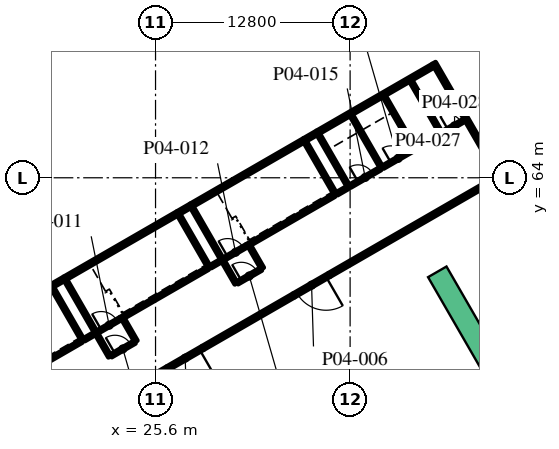
"""IFC4 building model, lengths in metres.
Left out: names, types, materials, properties, quantities, classifications, styles, units other than length and angle.
Written with IfcOpenShell. Run it as: python <this file> out.ifc"""

import sys

from ifc_helpers import new_model, si_unit, direction, frame, frame_2d, origin, place, context, subcontext, project, spatial, rectangle, extrude, element, fill, save


model = new_model("IFC4")
c1 = context("Model", 3, precision=1e-05, world=origin(), true_north=direction((0.0, 1.0)))
c2 = subcontext(c1, "Body", "Model", "MODEL_VIEW")
j1 = project(units=[si_unit("LENGTHUNIT", "METRE"), si_unit("PLANEANGLEUNIT", "RADIAN")], contexts=[c1])
p1 = place(None, origin())
s1 = spatial("IfcSite", under=j1, at=p1, CompositionType="ELEMENT")
p2 = place(p1, origin())
s2 = spatial("IfcBuilding", under=s1, at=p2, CompositionType="ELEMENT")
p3 = place(p2, frame((0.0, 0.0, 21.6)))
s3 = spatial("IfcBuildingStorey", under=s2, at=p3, CompositionType="ELEMENT", Elevation=21.6)
p4 = place(p3, frame((43.915, 71.542, 0.0), z_axis=(0.0, 0.0, 1.0), x_axis=(0.499999331568, -0.866025789703, 0.0)))
e1 = element("IfcWall", 1, at=p4, inside=s3, PredefinedType="SOLIDWALL", context=c2, shape_type="SweptSolid", body=[
    extrude(rectangle(XDim=8.625, YDim=0.25, at=frame_2d((4.312, 0.0))), origin(), (0.0, 0.0, 1.0), 4.5),
])
p5 = place(p3, frame((20.407, 48.01, 0.0), z_axis=(0.0, 0.0, 1.0), x_axis=(0.866013532718, 0.500020560727, 0.0)))
e2 = element("IfcWall", 2, at=p5, inside=s3, PredefinedType="SOLIDWALL", context=c2, shape_type="SweptSolid", body=[
    extrude(rectangle(XDim=6.9, YDim=0.25, at=frame_2d((3.45, 0.0))), origin(), (0.0, 0.0, 1.0), 4.5),
])
p6 = place(p3, frame((28.72, 52.811, 0.0), z_axis=(0.0, 0.0, 1.0), x_axis=(-0.866036505625, -0.499980770555, 0.0)))
e3 = element("IfcWall", 3, at=p6, inside=s3, PredefinedType="SOLIDWALL", context=c2, shape_type="SweptSolid", body=[
    extrude(rectangle(XDim=2.7, YDim=0.25, at=frame_2d((1.35, 0.0))), origin(), (0.0, 0.0, 1.0), 4.5),
])
p7 = place(p6, frame((0.25, 0.0, 0.0)))
e4 = element("IfcOpeningElement", 4, at=p7, cuts=e3, PredefinedType="OPENING", context=c2, shape_type="SweptSolid", body=[
    extrude(rectangle(XDim=2.2, YDim=2.1, at=frame_2d((1.1, 1.05))), frame((0.0, 0.135, 0.0), z_axis=(0.0, -1.0, 0.0), x_axis=(1.0, 0.0, 0.0)), (0.0, 0.0, 1.0), 0.27),
])
p8 = place(p3, frame((28.72, 52.811, 0.0), z_axis=(0.0, 0.0, 1.0), x_axis=(0.866028853923, 0.499994024137, 0.0)))
e5 = element("IfcWall", 5, at=p8, inside=s3, PredefinedType="SOLIDWALL", context=c2, shape_type="SweptSolid", body=[
    extrude(rectangle(XDim=6.9, YDim=0.25, at=frame_2d((3.45, 0.0))), origin(), (0.0, 0.0, 1.0), 4.5),
])
p9 = place(p3, frame((37.034, 57.611, 0.0), z_axis=(0.0, 0.0, 1.0), x_axis=(-0.866019956843, -0.50000943426, 0.0)))
e6 = element("IfcWall", 6, at=p9, inside=s3, PredefinedType="SOLIDWALL", context=c2, shape_type="SweptSolid", body=[
    extrude(rectangle(XDim=2.7, YDim=0.25, at=frame_2d((1.35, 0.0))), origin(), (0.0, 0.0, 1.0), 4.5),
])
p10 = place(p9, frame((0.25, 0.0, 0.0)))
e7 = element("IfcOpeningElement", 7, at=p10, cuts=e6, PredefinedType="OPENING", context=c2, shape_type="SweptSolid", body=[
    extrude(rectangle(XDim=2.2, YDim=2.1, at=frame_2d((1.1, 1.05))), frame((0.0, 0.135, 0.0), z_axis=(0.0, -1.0, 0.0), x_axis=(1.0, 0.0, 0.0)), (0.0, 0.0, 1.0), 0.27),
])
p11 = place(p3, frame((37.034, 57.611, 0.0), z_axis=(0.0, 0.0, 1.0), x_axis=(0.866025499775, 0.499999833739, 0.0)))
e8 = element("IfcWall", 8, at=p11, inside=s3, PredefinedType="SOLIDWALL", context=c2, shape_type="SweptSolid", body=[
    extrude(rectangle(XDim=12.8, YDim=0.25, at=frame_2d((6.4, 0.0))), origin(), (0.0, 0.0, 1.0), 4.5),
])
p12 = place(p3, frame((8.449, 50.922, 0.0), z_axis=(0.0, 0.0, 1.0), x_axis=(0.866026377112, 0.499998314143, 0.0)))
e9 = element("IfcWall", 9, at=p12, inside=s3, PredefinedType="SOLIDWALL", context=c2, shape_type="SweptSolid", body=[
    extrude(rectangle(XDim=11.9, YDim=0.25, at=frame_2d((5.95, 0.0))), origin(), (0.0, 0.0, 1.0), 4.5),
])
p13 = place(p3, frame((19.621, 57.372, 0.0), z_axis=(0.0, 0.0, 1.0), x_axis=(0.866021068297, 0.500007509209, 0.0)))
e10 = element("IfcWall", 10, at=p13, inside=s3, PredefinedType="SOLIDWALL", context=c2, shape_type="SweptSolid", body=[
    extrude(rectangle(XDim=8.6, YDim=0.25, at=frame_2d((4.3, 0.0))), origin(), (0.0, 0.0, 1.0), 4.5),
])
p14 = place(p3, frame((27.935, 62.172, 0.0), z_axis=(0.0, 0.0, 1.0), x_axis=(0.86604045752, 0.499973925258, 0.0)))
e11 = element("IfcWall", 11, at=p14, inside=s3, PredefinedType="SOLIDWALL", context=c2, shape_type="SweptSolid", body=[
    extrude(rectangle(XDim=8.6, YDim=0.25, at=frame_2d((4.3, 0.0))), origin(), (0.0, 0.0, 1.0), 4.5),
])
p15 = place(p3, frame((36.249, 66.972, 0.0), z_axis=(0.0, 0.0, 1.0), x_axis=(0.866013253925, 0.500021043584, 0.0)))
e12 = element("IfcWall", 12, at=p15, inside=s3, PredefinedType="SOLIDWALL", context=c2, shape_type="SweptSolid", body=[
    extrude(rectangle(XDim=8.8, YDim=0.25, at=frame_2d((4.4, 0.0))), origin(), (0.0, 0.0, 1.0), 4.5),
])
for number, where, z_axis, x_axis in (
    (13, (18.755, 56.872, 0.0), (0.0, 0.0, 1.0), (0.866, 0.5, 0.0)),
    (14, (27.069, 61.672, 0.0), (0.0, 0.0, 1.0), (0.866, 0.5, 0.0)),
    (15, (35.383, 66.472, 0.0), (0.0, 0.0, 1.0), (0.866, 0.5, 0.0)),
):
    element("IfcWall", number, at=place(p3, frame(where, z_axis=z_axis, x_axis=x_axis)), inside=s3, PredefinedType="SOLIDWALL", context=c2, shape_type="SweptSolid", body=[
        extrude(rectangle(XDim=1.0, YDim=0.25, at=frame_2d((0.5, 0.0))), origin(), (0.0, 0.0, 1.0), 4.5),
    ])
for number, where, z_axis, x_axis in (
    (16, (20.817, 53.299, 0.0), (0.0, 0.0, 1.0), (-0.5, 0.866, 0.0)),
    (17, (21.683, 53.799, 0.0), (0.0, 0.0, 1.0), (-0.5, 0.866, 0.0)),
    (18, (29.131, 58.099, 0.0), (0.0, 0.0, 1.0), (-0.5, 0.866, 0.0)),
    (19, (29.997, 58.599, 0.0), (0.0, 0.0, 1.0), (-0.5, 0.866, 0.0)),
    (20, (37.445, 62.899, 0.0), (0.0, 0.0, 1.0), (-0.5, 0.866, 0.0)),
):
    element("IfcWall", number, at=place(p3, frame(where, z_axis=z_axis, x_axis=x_axis)), inside=s3, PredefinedType="SOLIDWALL", context=c2, shape_type="SweptSolid", body=[
        extrude(rectangle(XDim=4.0, YDim=0.2, at=frame_2d((2.0, 0.0))), origin(), (0.0, 0.0, 1.0), 4.5),
    ])
p16 = place(p3, frame((14.972, 49.924, 0.0), z_axis=(0.0, 0.0, 1.0), x_axis=(0.86601134256, 0.500024353964, 0.0)))
e21 = element("IfcWall", 21, at=p16, inside=s3, PredefinedType="SOLIDWALL", context=c2, shape_type="SweptSolid", body=[
    extrude(rectangle(XDim=6.65, YDim=0.2, at=frame_2d((3.325, 0.0))), origin(), (0.0, 0.0, 1.0), 4.5),
])
p17 = place(p3, frame((21.77, 53.849, 0.0), z_axis=(0.0, 0.0, 1.0), x_axis=(0.866002029911, 0.500040482552, 0.0)))
e22 = element("IfcWall", 22, at=p17, inside=s3, PredefinedType="SOLIDWALL", context=c2, shape_type="SweptSolid", body=[
    extrude(rectangle(XDim=1.75, YDim=0.2, at=frame_2d((0.875, 0.0))), origin(), (0.0, 0.0, 1.0), 4.5),
])
p18 = place(p17, frame((0.3, 0.0, 0.0)))
e23 = element("IfcOpeningElement", 23, at=p18, cuts=e22, PredefinedType="OPENING", context=c2, shape_type="SweptSolid", body=[
    extrude(rectangle(XDim=1.2, YDim=2.1, at=frame_2d((0.6, 1.05))), frame((0.0, 0.11, 0.0), z_axis=(0.0, -1.0, 0.0), x_axis=(1.0, 0.0, 0.0)), (0.0, 0.0, 1.0), 0.22),
])
p19 = place(p3, frame((23.285, 54.724, 0.0), z_axis=(0.0, 0.0, 1.0), x_axis=(0.866027239912, 0.49999681972, 0.0)))
e24 = element("IfcWall", 24, at=p19, inside=s3, PredefinedType="SOLIDWALL", context=c2, shape_type="SweptSolid", body=[
    extrude(rectangle(XDim=6.65, YDim=0.2, at=frame_2d((3.325, 0.0))), origin(), (0.0, 0.0, 1.0), 4.5),
])
p20 = place(p3, frame((30.084, 58.649, 0.0), z_axis=(0.0, 0.0, 1.0), x_axis=(0.866036909293, 0.499980071345, 0.0)))
e25 = element("IfcWall", 25, at=p20, inside=s3, PredefinedType="SOLIDWALL", context=c2, shape_type="SweptSolid", body=[
    extrude(rectangle(XDim=1.75, YDim=0.2, at=frame_2d((0.875, 0.0))), origin(), (0.0, 0.0, 1.0), 4.5),
])
p21 = place(p20, frame((0.3, 0.0, 0.0)))
e26 = element("IfcOpeningElement", 26, at=p21, cuts=e25, PredefinedType="OPENING", context=c2, shape_type="SweptSolid", body=[
    extrude(rectangle(XDim=1.2, YDim=2.1, at=frame_2d((0.6, 1.05))), frame((0.0, 0.11, 0.0), z_axis=(0.0, -1.0, 0.0), x_axis=(1.0, 0.0, 0.0)), (0.0, 0.0, 1.0), 0.22),
])
p22 = place(p3, frame((31.599, 59.524, 0.0), z_axis=(0.0, 0.0, 1.0), x_axis=(0.866027239912, 0.49999681972, 0.0)))
e27 = element("IfcWall", 27, at=p22, inside=s3, PredefinedType="SOLIDWALL", context=c2, shape_type="SweptSolid", body=[
    extrude(rectangle(XDim=6.65, YDim=0.2, at=frame_2d((3.325, 0.0))), origin(), (0.0, 0.0, 1.0), 4.5),
])
for number, where, z_axis, x_axis in (
    (28, (38.311, 63.399, 0.0), (0.0, 0.0, 1.0), (-0.5, 0.866, 0.0)),
    (29, (40.476, 64.649, 0.0), (0.0, 0.0, 1.0), (-0.5, 0.866, 0.0)),
    (30, (42.641, 65.899, 0.0), (0.0, 0.0, 1.0), (-0.5, 0.866, 0.0)),
):
    element("IfcWall", number, at=place(p3, frame(where, z_axis=z_axis, x_axis=x_axis)), inside=s3, PredefinedType="SOLIDWALL", context=c2, shape_type="SweptSolid", body=[
        extrude(rectangle(XDim=4.0, YDim=0.2, at=frame_2d((2.0, 0.0))), origin(), (0.0, 0.0, 1.0), 4.5),
    ])
p23 = place(p3, frame((38.398, 63.449, 0.0), z_axis=(0.0, 0.0, 1.0), x_axis=(0.86602648383, 0.499998129301, 0.0)))
e31 = element("IfcWall", 31, at=p23, inside=s3, PredefinedType="SOLIDWALL", context=c2, shape_type="SweptSolid", body=[
    extrude(rectangle(XDim=2.3, YDim=0.2, at=frame_2d((1.15, 0.0))), origin(), (0.0, 0.0, 1.0), 4.5),
])
p24 = place(p23, frame((0.6, 0.0, 0.0)))
e32 = element("IfcOpeningElement", 32, at=p24, cuts=e31, PredefinedType="OPENING", context=c2, shape_type="SweptSolid", body=[
    extrude(rectangle(XDim=1.1, YDim=2.1, at=frame_2d((0.55, 1.05))), frame((0.0, 0.11, 0.0), z_axis=(0.0, -1.0, 0.0), x_axis=(1.0, 0.0, 0.0)), (0.0, 0.0, 1.0), 0.22),
])
p25 = place(p3, frame((40.563, 64.699, 0.0), z_axis=(0.0, 0.0, 1.0), x_axis=(0.86602648383, 0.499998129301, 0.0)))
e33 = element("IfcWall", 33, at=p25, inside=s3, PredefinedType="SOLIDWALL", context=c2, shape_type="SweptSolid", body=[
    extrude(rectangle(XDim=2.3, YDim=0.2, at=frame_2d((1.15, 0.0))), origin(), (0.0, 0.0, 1.0), 4.5),
])
p26 = place(p25, frame((0.6, 0.0, 0.0)))
e34 = element("IfcOpeningElement", 34, at=p26, cuts=e33, PredefinedType="OPENING", context=c2, shape_type="SweptSolid", body=[
    extrude(rectangle(XDim=1.1, YDim=2.1, at=frame_2d((0.55, 1.05))), frame((0.0, 0.11, 0.0), z_axis=(0.0, -1.0, 0.0), x_axis=(1.0, 0.0, 0.0)), (0.0, 0.0, 1.0), 0.22),
])
p27 = place(p3, frame((22.583, 52.24, 0.0), z_axis=(0.0, 0.0, 1.0), x_axis=(-0.499892348375, 0.866087547558, 0.0)))
e35 = element("IfcWall", 35, at=p27, inside=s3, PredefinedType="PARTITIONING", context=c2, shape_type="SweptSolid", body=[
    extrude(rectangle(XDim=1.7, YDim=0.2, at=frame_2d((0.85, 0.0))), origin(), (0.0, 0.0, 1.0), 4.5),
])
p28 = place(p3, frame((24.315, 53.24, 0.0), z_axis=(0.0, 0.0, 1.0), x_axis=(-0.500000056704, 0.866025371046, 0.0)))
e36 = element("IfcWall", 36, at=p28, inside=s3, PredefinedType="PARTITIONING", context=c2, shape_type="SweptSolid", body=[
    extrude(rectangle(XDim=1.7, YDim=0.2, at=frame_2d((0.85, 0.0))), origin(), (0.0, 0.0, 1.0), 4.5),
])
for number, where, z_axis, x_axis in (
    (37, (30.897, 57.041, 0.0), (0.0, 0.0, 1.0), (-0.5, 0.866, 0.0)),
    (38, (32.629, 58.041, 0.0), (0.0, 0.0, 1.0), (-0.5, 0.866, 0.0)),
):
    element("IfcWall", number, at=place(p3, frame(where, z_axis=z_axis, x_axis=x_axis)), inside=s3, PredefinedType="PARTITIONING", context=c2, shape_type="SweptSolid", body=[
        extrude(rectangle(XDim=1.7, YDim=0.2, at=frame_2d((0.85, 0.0))), origin(), (0.0, 0.0, 1.0), 4.5),
    ])
p29 = place(p3, frame((22.67, 52.291, 0.0), z_axis=(0.0, 0.0, 1.0), x_axis=(0.865989075817, 0.500062916607, 0.0)))
e39 = element("IfcWall", 39, at=p29, inside=s3, PredefinedType="PARTITIONING", context=c2, shape_type="SweptSolid", body=[
    extrude(rectangle(XDim=1.8, YDim=0.2, at=frame_2d((0.9, 0.0))), origin(), (0.0, 0.0, 1.0), 4.5),
])
p30 = place(p29, frame((0.3, 0.0, 0.0)))
e40 = element("IfcOpeningElement", 40, at=p30, cuts=e39, PredefinedType="OPENING", context=c2, shape_type="SweptSolid", body=[
    extrude(rectangle(XDim=1.2, YDim=2.1, at=frame_2d((0.6, 1.05))), frame((0.0, 0.11, 0.0), z_axis=(0.0, -1.0, 0.0), x_axis=(1.0, 0.0, 0.0)), (0.0, 0.0, 1.0), 0.22),
])
p31 = place(p3, frame((30.984, 57.091, 0.0), z_axis=(0.0, 0.0, 1.0), x_axis=(0.866047807691, 0.499961193289, 0.0)))
e41 = element("IfcWall", 41, at=p31, inside=s3, PredefinedType="PARTITIONING", context=c2, shape_type="SweptSolid", body=[
    extrude(rectangle(XDim=1.8, YDim=0.2, at=frame_2d((0.9, 0.0))), origin(), (0.0, 0.0, 1.0), 4.5),
])
p32 = place(p31, frame((0.3, 0.0, 0.0)))
e42 = element("IfcOpeningElement", 42, at=p32, cuts=e41, PredefinedType="OPENING", context=c2, shape_type="SweptSolid", body=[
    extrude(rectangle(XDim=1.2, YDim=2.1, at=frame_2d((0.6, 1.05))), frame((0.0, 0.11, 0.0), z_axis=(0.0, -1.0, 0.0), x_axis=(1.0, 0.0, 0.0)), (0.0, 0.0, 1.0), 0.22),
])
p33 = place(p3, frame((44.395, 66.912, 0.0), z_axis=(0.0, 0.0, 1.0), x_axis=(-0.49999894854, 0.866026010844, 0.0)))
e43 = element("IfcWall", 43, at=p33, inside=s3, PredefinedType="PARTITIONING", context=c2, shape_type="SweptSolid", body=[
    extrude(rectangle(XDim=4.0, YDim=0.2, at=frame_2d((2.0, 0.0))), origin(), (0.0, 0.0, 1.0), 4.5),
])
p34 = place(p3, frame((42.728, 65.949, 0.0), z_axis=(0.0, 0.0, 1.0), x_axis=(0.866036312054, 0.499981105847, 0.0)))
e44 = element("IfcWall", 44, at=p34, inside=s3, PredefinedType="PARTITIONING", context=c2, shape_type="SweptSolid", body=[
    extrude(rectangle(XDim=1.825, YDim=0.2, at=frame_2d((0.912, 0.0))), origin(), (0.0, 0.0, 1.0), 4.5),
])
p35 = place(p34, frame((0.413, 0.0, 0.0)))
e45 = element("IfcOpeningElement", 45, at=p35, cuts=e44, PredefinedType="OPENING", context=c2, shape_type="SweptSolid", body=[
    extrude(rectangle(XDim=1.0, YDim=2.1, at=frame_2d((0.5, 1.05))), frame((0.0, 0.11, 0.0), z_axis=(0.0, -1.0, 0.0), x_axis=(1.0, 0.0, 0.0)), (0.0, 0.0, 1.0), 0.22),
])
p36 = place(p3, frame((44.481, 66.962, 0.0), z_axis=(0.0, 0.0, 1.0), x_axis=(0.866027799164, 0.499995851058, 0.0)))
e46 = element("IfcWall", 46, at=p36, inside=s3, PredefinedType="PARTITIONING", context=c2, shape_type="SweptSolid", body=[
    extrude(rectangle(XDim=1.675, YDim=0.2, at=frame_2d((0.837, 0.0))), origin(), (0.0, 0.0, 1.0), 4.5),
])
p37 = place(p36, frame((0.413, 0.0, 0.0)))
e47 = element("IfcOpeningElement", 47, at=p37, cuts=e46, PredefinedType="OPENING", context=c2, shape_type="SweptSolid", body=[
    extrude(rectangle(XDim=1.0, YDim=2.1, at=frame_2d((0.5, 1.05))), frame((0.0, 0.11, 0.0), z_axis=(0.0, -1.0, 0.0), x_axis=(1.0, 0.0, 0.0)), (0.0, 0.0, 1.0), 0.22),
])
p38 = place(p3, frame((20.904, 53.349, 0.0), z_axis=(0.0, 0.0, 1.0), x_axis=(0.865961984968, 0.500109828528, 0.0)))
e48 = element("IfcWall", 48, at=p38, inside=s3, PredefinedType="PARTITIONING", context=c2, shape_type="SweptSolid", body=[
    extrude(rectangle(XDim=0.8, YDim=0.2, at=frame_2d((0.4, 0.0))), origin(), (0.0, 0.0, 1.0), 4.5),
])
p39 = place(p3, frame((29.218, 58.149, 0.0), z_axis=(0.0, 0.0, 1.0), x_axis=(0.866017831539, 0.500013115284, 0.0)))
e49 = element("IfcWall", 49, at=p39, inside=s3, PredefinedType="PARTITIONING", context=c2, shape_type="SweptSolid", body=[
    extrude(rectangle(XDim=0.8, YDim=0.2, at=frame_2d((0.4, 0.0))), origin(), (0.0, 0.0, 1.0), 4.5),
])
p40 = place(p3, frame((37.531, 62.949, 0.0), z_axis=(0.0, 0.0, 1.0), x_axis=(0.866094119867, 0.499880961361, 0.0)))
e50 = element("IfcWall", 50, at=p40, inside=s3, PredefinedType="PARTITIONING", context=c2, shape_type="SweptSolid", body=[
    extrude(rectangle(XDim=0.8, YDim=0.2, at=frame_2d((0.4, 0.0))), origin(), (0.0, 0.0, 1.0), 4.5),
])
p41 = place(p3, frame((50.135, 47.42, 0.0), z_axis=(0.0, 0.0, 1.0), x_axis=(-0.49999894854, 0.866026010844, 0.0)))
e51 = element("IfcWall", 51, at=p41, inside=s3, PredefinedType="SOLIDWALL", context=c2, shape_type="SweptSolid", body=[
    extrude(rectangle(XDim=12.0, YDim=1.4, at=frame_2d((6.0, 0.0))), origin(), (0.0, 0.0, 1.0), 0.9),
])
p42 = place(p7, origin())
e52 = element("IfcDoor", 52, at=p42, inside=s3, OperationType="DOUBLE_DOOR_SINGLE_SWING", PredefinedType="DOOR", context=c2, shape_type="SweptSolid", body=[
    extrude(rectangle(XDim=2.2, YDim=2.1, at=frame_2d((1.1, 1.05))), frame((0.0, 0.025, 0.0), z_axis=(0.0, -1.0, 0.0), x_axis=(1.0, 0.0, 0.0)), (0.0, 0.0, 1.0), 0.05),
])
fill(e4, e52)
p43 = place(p10, origin())
e53 = element("IfcDoor", 53, at=p43, inside=s3, OperationType="DOUBLE_DOOR_SINGLE_SWING", PredefinedType="DOOR", context=c2, shape_type="SweptSolid", body=[
    extrude(rectangle(XDim=2.2, YDim=2.1, at=frame_2d((1.1, 1.05))), frame((0.0, 0.025, 0.0), z_axis=(0.0, -1.0, 0.0), x_axis=(1.0, 0.0, 0.0)), (0.0, 0.0, 1.0), 0.05),
])
fill(e7, e53)
p44 = place(p18, origin())
e54 = element("IfcDoor", 54, at=p44, inside=s3, OperationType="SINGLE_SWING_LEFT", PredefinedType="DOOR", context=c2, shape_type="SweptSolid", body=[
    extrude(rectangle(XDim=1.2, YDim=2.1, at=frame_2d((0.6, 1.05))), frame((0.0, 0.025, 0.0), z_axis=(0.0, -1.0, 0.0), x_axis=(1.0, 0.0, 0.0)), (0.0, 0.0, 1.0), 0.05),
])
fill(e23, e54)
p45 = place(p21, origin())
e55 = element("IfcDoor", 55, at=p45, inside=s3, OperationType="SINGLE_SWING_LEFT", PredefinedType="DOOR", context=c2, shape_type="SweptSolid", body=[
    extrude(rectangle(XDim=1.2, YDim=2.1, at=frame_2d((0.6, 1.05))), frame((0.0, 0.025, 0.0), z_axis=(0.0, -1.0, 0.0), x_axis=(1.0, 0.0, 0.0)), (0.0, 0.0, 1.0), 0.05),
])
fill(e26, e55)
p46 = place(p24, origin())
e56 = element("IfcDoor", 56, at=p46, inside=s3, OperationType="DOUBLE_DOOR_SLIDING", PredefinedType="DOOR", context=c2, shape_type="SweptSolid", body=[
    extrude(rectangle(XDim=1.1, YDim=2.1, at=frame_2d((0.55, 1.05))), frame((0.0, 0.025, 0.0), z_axis=(0.0, -1.0, 0.0), x_axis=(1.0, 0.0, 0.0)), (0.0, 0.0, 1.0), 0.05),
])
fill(e32, e56)
p47 = place(p26, origin())
e57 = element("IfcDoor", 57, at=p47, inside=s3, OperationType="DOUBLE_DOOR_SLIDING", PredefinedType="DOOR", context=c2, shape_type="SweptSolid", body=[
    extrude(rectangle(XDim=1.1, YDim=2.1, at=frame_2d((0.55, 1.05))), frame((0.0, 0.025, 0.0), z_axis=(0.0, -1.0, 0.0), x_axis=(1.0, 0.0, 0.0)), (0.0, 0.0, 1.0), 0.05),
])
fill(e34, e57)
p48 = place(p30, origin())
e58 = element("IfcDoor", 58, at=p48, inside=s3, OperationType="SINGLE_SWING_LEFT", PredefinedType="DOOR", context=c2, shape_type="SweptSolid", body=[
    extrude(rectangle(XDim=1.2, YDim=2.1, at=frame_2d((0.6, 1.05))), frame((0.0, 0.025, 0.0), z_axis=(0.0, -1.0, 0.0), x_axis=(1.0, 0.0, 0.0)), (0.0, 0.0, 1.0), 0.05),
])
fill(e40, e58)
p49 = place(p32, origin())
e59 = element("IfcDoor", 59, at=p49, inside=s3, OperationType="SINGLE_SWING_LEFT", PredefinedType="DOOR", context=c2, shape_type="SweptSolid", body=[
    extrude(rectangle(XDim=1.2, YDim=2.1, at=frame_2d((0.6, 1.05))), frame((0.0, 0.025, 0.0), z_axis=(0.0, -1.0, 0.0), x_axis=(1.0, 0.0, 0.0)), (0.0, 0.0, 1.0), 0.05),
])
fill(e42, e59)
p50 = place(p35, origin())
e60 = element("IfcDoor", 60, at=p50, inside=s3, OperationType="SINGLE_SWING_LEFT", PredefinedType="DOOR", context=c2, shape_type="SweptSolid", body=[
    extrude(rectangle(XDim=1.0, YDim=2.1, at=frame_2d((0.5, 1.05))), frame((0.0, 0.025, 0.0), z_axis=(0.0, -1.0, 0.0), x_axis=(1.0, 0.0, 0.0)), (0.0, 0.0, 1.0), 0.05),
])
fill(e45, e60)
p51 = place(p37, origin())
e61 = element("IfcDoor", 61, at=p51, inside=s3, OperationType="SINGLE_SWING_LEFT", PredefinedType="DOOR", context=c2, shape_type="SweptSolid", body=[
    extrude(rectangle(XDim=1.0, YDim=2.1, at=frame_2d((0.5, 1.05))), frame((0.0, 0.025, 0.0), z_axis=(0.0, -1.0, 0.0), x_axis=(1.0, 0.0, 0.0)), (0.0, 0.0, 1.0), 0.05),
])
fill(e47, e61)
save(model, sys.argv[1])
